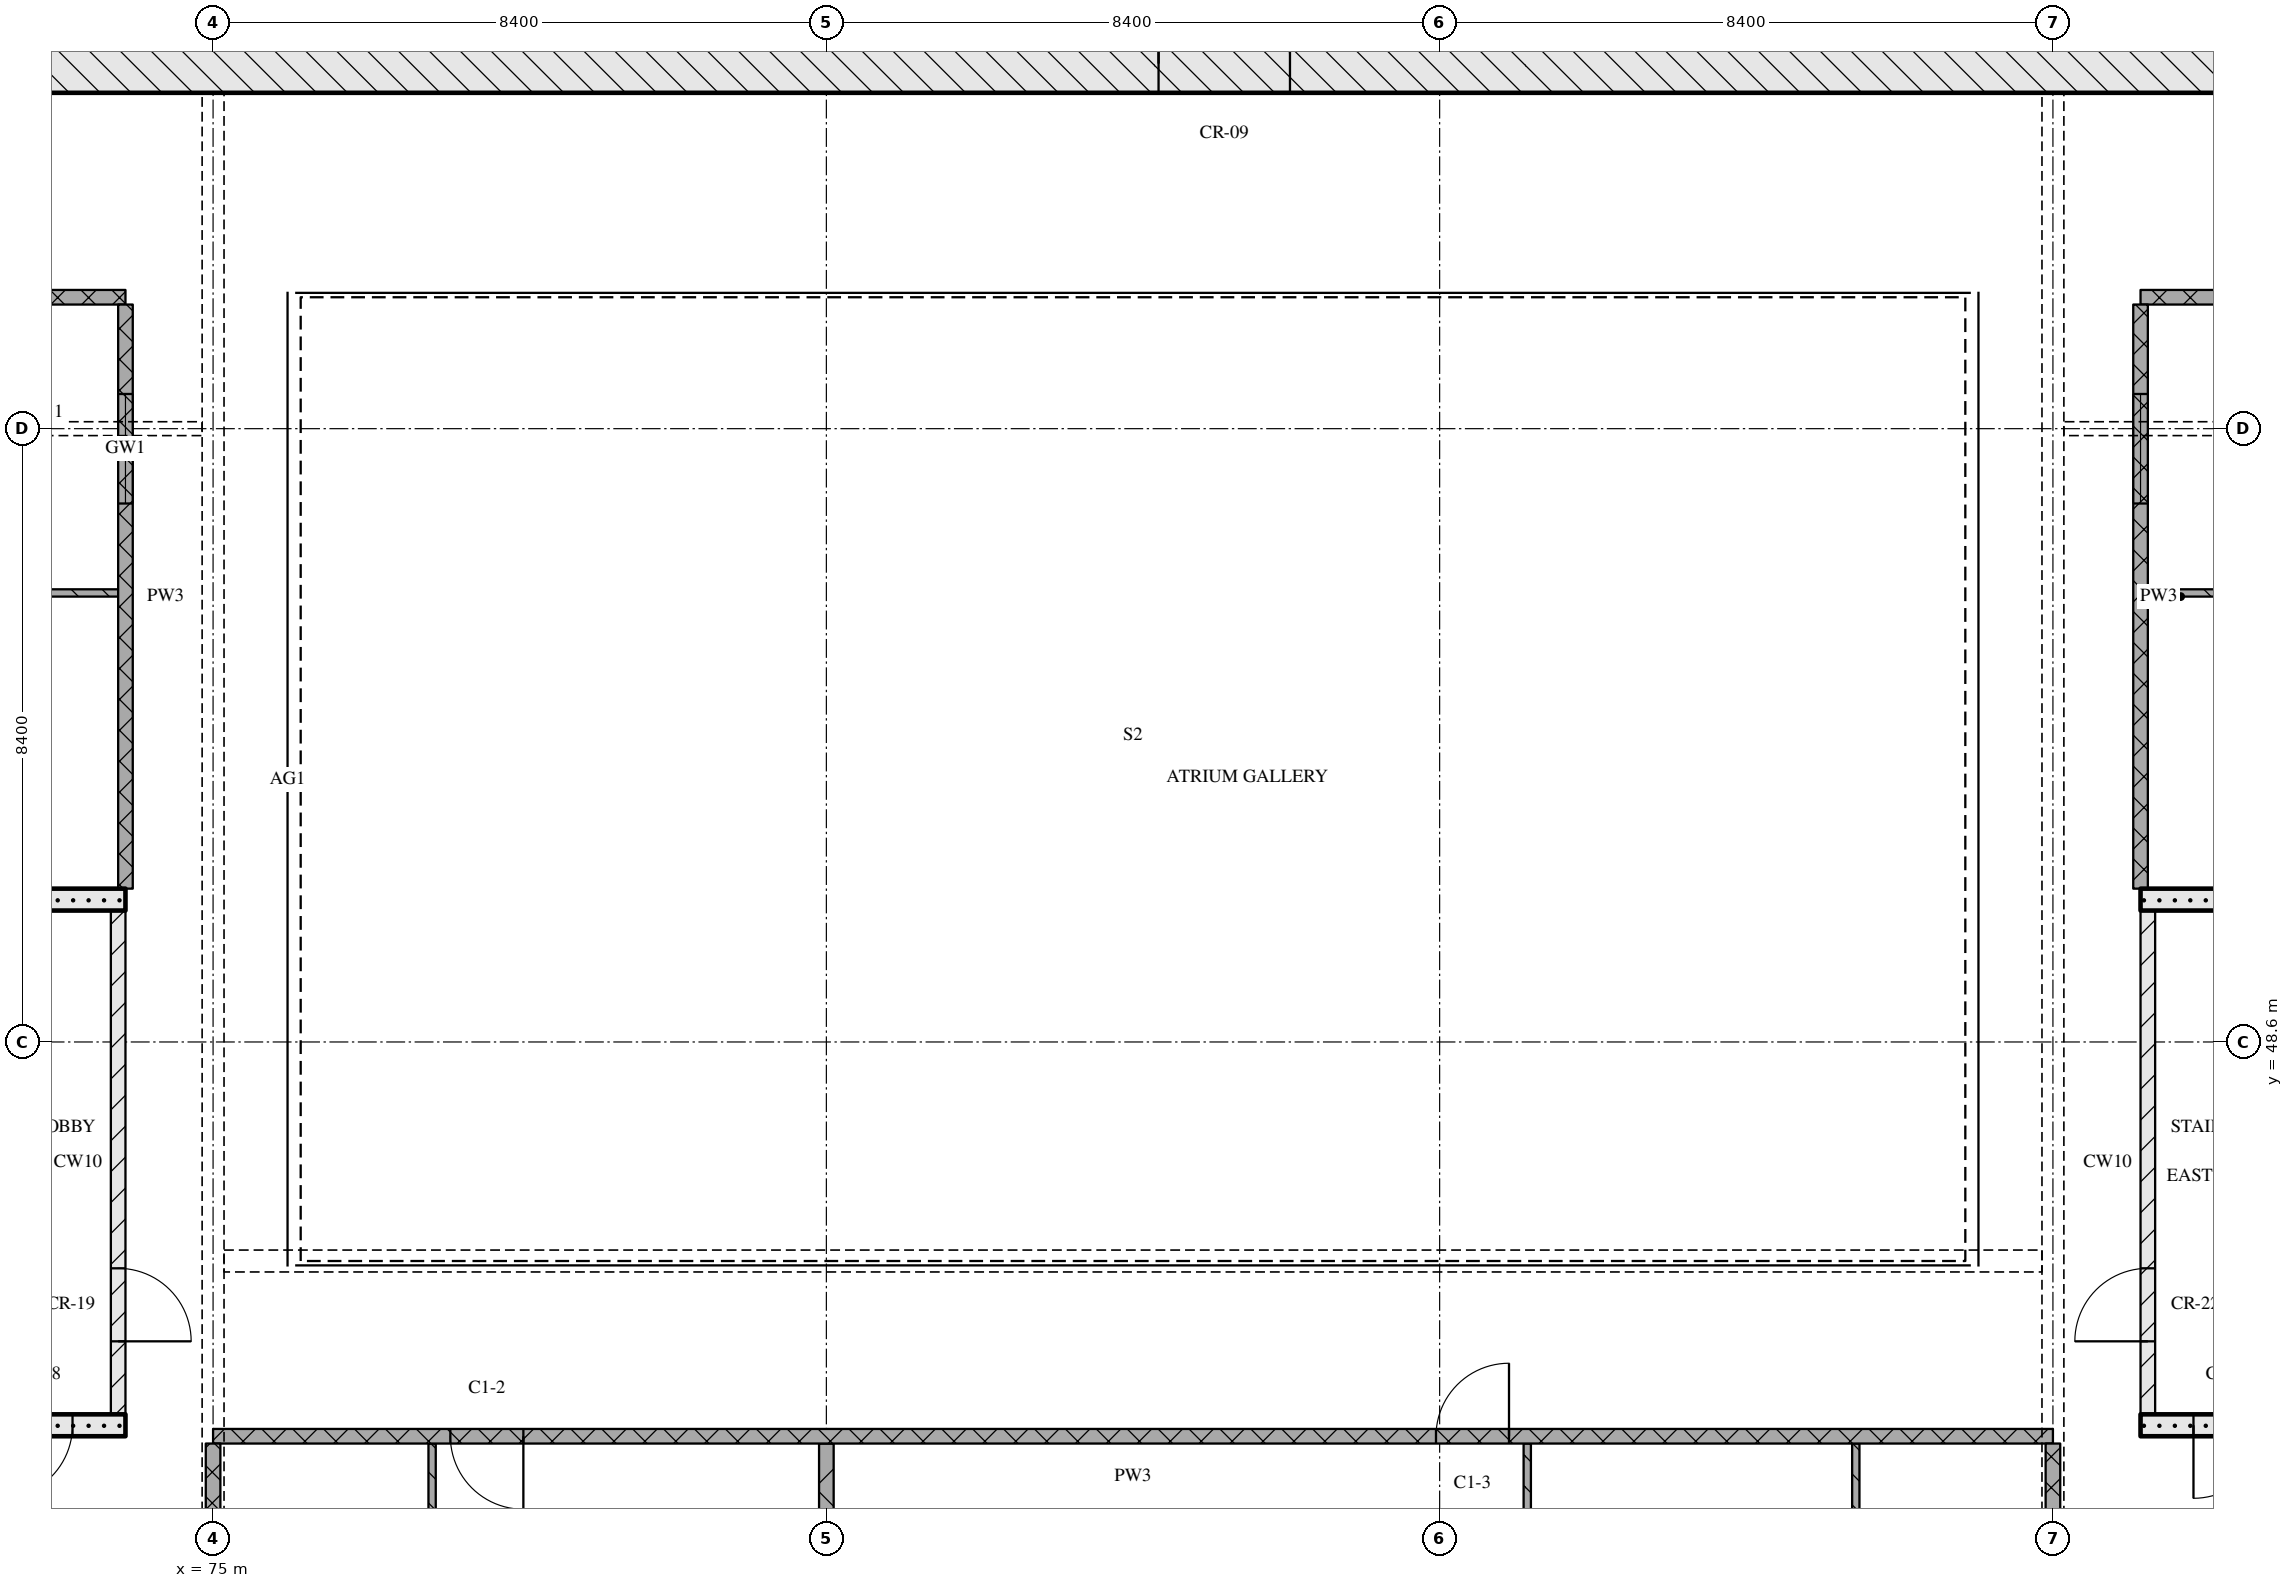
"""IFC4 building model, lengths in metres.
Left out: names, types, materials, properties, quantities, classifications, styles, units other than length and angle.
Written with IfcOpenShell. Run it as: python <this file> out.ifc"""

import sys

from ifc_helpers import new_model, si_unit, direction, frame, frame_2d, origin, place, context, subcontext, project, spatial, rectangle, extrude, element, fill, save


model = new_model("IFC4")
c1 = context("Model", 3, precision=1e-05, world=origin(), true_north=direction((0.0, 1.0)))
c2 = subcontext(c1, "Body", "Model", "MODEL_VIEW")
j1 = project(units=[si_unit("LENGTHUNIT", "METRE"), si_unit("PLANEANGLEUNIT", "RADIAN")], contexts=[c1])
p1 = place(None, origin())
s1 = spatial("IfcSite", under=j1, at=p1, CompositionType="ELEMENT")
p2 = place(p1, origin())
s2 = spatial("IfcBuilding", under=s1, at=p2, CompositionType="ELEMENT")
p3 = place(p2, frame((0.0, 0.0, 154.65)))
s3 = spatial("IfcBuildingStorey", under=s2, at=p3, CompositionType="ELEMENT", Elevation=154.65)
p4 = place(p3, frame((67.0, 62.0, 0.0), z_axis=(0.0, 0.0, 1.0), x_axis=(1.0, 0.0, 0.0)))
e1 = element("IfcWall", 1, at=p4, inside=s3, PredefinedType="SOLIDWALL", context=c2, shape_type="SweptSolid", body=[
    extrude(rectangle(XDim=41.2, YDim=0.8, at=frame_2d((20.6, 0.0))), origin(), (0.0, 0.0, 1.0), 3.32),
])
p5 = place(p4, frame((20.95, 0.0, 0.0)))
e2 = element("IfcOpeningElement", 2, at=p5, cuts=e1, PredefinedType="OPENING", context=c2, shape_type="SweptSolid", body=[
    extrude(rectangle(XDim=1.8, YDim=2.1, at=frame_2d((0.9, 1.05))), frame((0.0, 0.41, 0.0), z_axis=(0.0, -1.0, 0.0), x_axis=(1.0, 0.0, 0.0)), (0.0, 0.0, 1.0), 0.82),
])
p6 = place(p3, frame((68.2, 43.35, 0.0), z_axis=(0.0, 0.0, 1.0), x_axis=(1.0, 0.0, 0.0)))
e3 = element("IfcWall", 3, at=p6, inside=s3, PredefinedType="SOLIDWALL", context=c2, shape_type="SweptSolid", body=[
    extrude(rectangle(XDim=5.6, YDim=0.3, at=frame_2d((2.8, 0.0))), origin(), (0.0, 0.0, 1.0), 3.32),
])
p7 = place(p6, frame((3.875, 0.0, 0.0)))
e4 = element("IfcOpeningElement", 4, at=p7, cuts=e3, PredefinedType="OPENING", context=c2, shape_type="SweptSolid", body=[
    extrude(rectangle(XDim=1.0, YDim=2.1, at=frame_2d((0.5, 1.05))), frame((0.0, 0.16, 0.0), z_axis=(0.0, -1.0, 0.0), x_axis=(1.0, 0.0, 0.0)), (0.0, 0.0, 1.0), 0.32),
])
p8 = place(p3, frame((73.7, 43.5, 0.0), z_axis=(0.0, 0.0, 1.0), x_axis=(0.0, 1.0, 0.0)))
e5 = element("IfcWall", 5, at=p8, inside=s3, PredefinedType="PARTITIONING", context=c2, shape_type="SweptSolid", body=[
    extrude(rectangle(XDim=6.9, YDim=0.2, at=frame_2d((3.45, 0.0))), origin(), (0.0, 0.0, 1.0), 3.32),
])
p9 = place(p8, frame((1.0, 0.0, 0.0)))
e6 = element("IfcOpeningElement", 6, at=p9, cuts=e5, PredefinedType="OPENING", context=c2, shape_type="SweptSolid", body=[
    extrude(rectangle(XDim=1.0, YDim=2.1, at=frame_2d((0.5, 1.05))), frame((0.0, 0.11, 0.0), z_axis=(0.0, -1.0, 0.0), x_axis=(1.0, 0.0, 0.0)), (0.0, 0.0, 1.0), 0.22),
])
p10 = place(p3, frame((68.2, 50.55, 0.0), z_axis=(0.0, 0.0, 1.0), x_axis=(1.0, 0.0, 0.0)))
e7 = element("IfcWall", 7, at=p10, inside=s3, PredefinedType="SOLIDWALL", context=c2, shape_type="SweptSolid", body=[
    extrude(rectangle(XDim=5.6, YDim=0.3, at=frame_2d((2.8, 0.0))), origin(), (0.0, 0.0, 1.0), 3.32),
])
p11 = place(p3, frame((101.4, 43.35, 0.0), z_axis=(0.0, 0.0, 1.0), x_axis=(1.0, 0.0, 0.0)))
e8 = element("IfcWall", 8, at=p11, inside=s3, PredefinedType="SOLIDWALL", context=c2, shape_type="SweptSolid", body=[
    extrude(rectangle(XDim=5.6, YDim=0.3, at=frame_2d((2.8, 0.0))), origin(), (0.0, 0.0, 1.0), 3.32),
])
p12 = place(p11, frame((0.725, 0.0, 0.0)))
e9 = element("IfcOpeningElement", 9, at=p12, cuts=e8, PredefinedType="OPENING", context=c2, shape_type="SweptSolid", body=[
    extrude(rectangle(XDim=1.0, YDim=2.1, at=frame_2d((0.5, 1.05))), frame((0.0, 0.16, 0.0), z_axis=(0.0, -1.0, 0.0), x_axis=(1.0, 0.0, 0.0)), (0.0, 0.0, 1.0), 0.32),
])
p13 = place(p3, frame((101.5, 43.5, 0.0), z_axis=(0.0, 0.0, 1.0), x_axis=(0.0, 1.0, 0.0)))
e10 = element("IfcWall", 10, at=p13, inside=s3, PredefinedType="PARTITIONING", context=c2, shape_type="SweptSolid", body=[
    extrude(rectangle(XDim=6.9, YDim=0.2, at=frame_2d((3.45, 0.0))), origin(), (0.0, 0.0, 1.0), 3.32),
])
p14 = place(p13, frame((1.0, 0.0, 0.0)))
e11 = element("IfcOpeningElement", 11, at=p14, cuts=e10, PredefinedType="OPENING", context=c2, shape_type="SweptSolid", body=[
    extrude(rectangle(XDim=1.0, YDim=2.1, at=frame_2d((0.5, 1.05))), frame((0.0, 0.11, 0.0), z_axis=(0.0, -1.0, 0.0), x_axis=(1.0, 0.0, 0.0)), (0.0, 0.0, 1.0), 0.22),
])
p15 = place(p3, frame((101.4, 50.55, 0.0), z_axis=(0.0, 0.0, 1.0), x_axis=(1.0, 0.0, 0.0)))
e12 = element("IfcWall", 12, at=p15, inside=s3, PredefinedType="SOLIDWALL", context=c2, shape_type="SweptSolid", body=[
    extrude(rectangle(XDim=5.6, YDim=0.3, at=frame_2d((2.8, 0.0))), origin(), (0.0, 0.0, 1.0), 3.32),
])
p16 = place(p3, frame((100.2, 43.2, 0.0), z_axis=(0.0, 0.0, 1.0), x_axis=(-1.0, 0.0, 0.0)))
e13 = element("IfcWall", 13, at=p16, inside=s3, PredefinedType="PARTITIONING", context=c2, shape_type="SweptSolid", body=[
    extrude(rectangle(XDim=25.2, YDim=0.2, at=frame_2d((12.6, 0.0))), origin(), (0.0, 0.0, 1.0), 3.32),
])
p17 = place(p16, frame((7.45, 0.0, 0.0)))
e14 = element("IfcOpeningElement", 14, at=p17, cuts=e13, PredefinedType="OPENING", context=c2, shape_type="SweptSolid", body=[
    extrude(rectangle(XDim=1.0, YDim=2.1, at=frame_2d((0.5, 1.05))), frame((0.0, 0.11, 0.0), z_axis=(0.0, -1.0, 0.0), x_axis=(1.0, 0.0, 0.0)), (0.0, 0.0, 1.0), 0.22),
])
p18 = place(p16, frame((20.95, 0.0, 0.0)))
e15 = element("IfcOpeningElement", 15, at=p18, cuts=e13, PredefinedType="OPENING", context=c2, shape_type="SweptSolid", body=[
    extrude(rectangle(XDim=1.0, YDim=2.1, at=frame_2d((0.5, 1.05))), frame((0.0, 0.11, 0.0), z_axis=(0.0, -1.0, 0.0), x_axis=(1.0, 0.0, 0.0)), (0.0, 0.0, 1.0), 0.22),
])
p19 = place(p3, frame((69.3, 54.75, 0.0), z_axis=(0.0, 0.0, 1.0), x_axis=(1.0, 0.0, 0.0)))
e16 = element("IfcWall", 16, at=p19, inside=s3, PredefinedType="PARTITIONING", context=c2, shape_type="SweptSolid", body=[
    extrude(rectangle(XDim=4.4, YDim=0.1, at=frame_2d((2.2, 0.0))), origin(), (0.0, 0.0, 1.0), 3.32),
])
p20 = place(p3, frame((101.5, 54.75, 0.0), z_axis=(0.0, 0.0, 1.0), x_axis=(1.0, 0.0, 0.0)))
e17 = element("IfcWall", 17, at=p20, inside=s3, PredefinedType="PARTITIONING", context=c2, shape_type="SweptSolid", body=[
    extrude(rectangle(XDim=4.4, YDim=0.1, at=frame_2d((2.2, 0.0))), origin(), (0.0, 0.0, 1.0), 3.32),
])
p21 = place(p20, frame((1.7, 0.0, 0.0)))
e18 = element("IfcOpeningElement", 18, at=p21, cuts=e17, PredefinedType="OPENING", context=c2, shape_type="SweptSolid", body=[
    extrude(rectangle(XDim=0.9, YDim=2.1, at=frame_2d((0.45, 1.05))), frame((0.0, 0.06, 0.0), z_axis=(0.0, -1.0, 0.0), x_axis=(1.0, 0.0, 0.0)), (0.0, 0.0, 1.0), 0.12),
])
for number, where, z_axis, x_axis in (
    (19, (63.0, 58.8, 0.0), (0.0, 0.0, 1.0), (1.0, 0.0, 0.0)),
    (20, (101.4, 58.8, 0.0), (0.0, 0.0, 1.0), (1.0, 0.0, 0.0)),
):
    element("IfcWall", number, at=place(p3, frame(where, z_axis=z_axis, x_axis=x_axis)), inside=s3, PredefinedType="PARTITIONING", context=c2, shape_type="SweptSolid", body=[
        extrude(rectangle(XDim=10.8, YDim=0.2, at=frame_2d((5.4, 0.0))), origin(), (0.0, 0.0, 1.0), 3.32),
    ])
p22 = place(p3, frame((73.8, 58.7, 0.0), z_axis=(0.0, 0.0, 1.0), x_axis=(0.0, -1.0, 0.0)))
e21 = element("IfcWall", 21, at=p22, inside=s3, PredefinedType="PARTITIONING", context=c2, shape_type="SweptSolid", body=[
    extrude(rectangle(XDim=8.0, YDim=0.2, at=frame_2d((4.0, 0.0))), origin(), (0.0, 0.0, 1.0), 3.32),
])
p23 = place(p22, frame((1.225, 0.0, 0.9)))
e22 = element("IfcOpeningElement", 22, at=p23, cuts=e21, PredefinedType="OPENING", context=c2, shape_type="SweptSolid", body=[
    extrude(rectangle(XDim=1.5, YDim=1.5, at=frame_2d((0.75, 0.75))), frame((0.0, 0.11, 0.0), z_axis=(0.0, -1.0, 0.0), x_axis=(1.0, 0.0, 0.0)), (0.0, 0.0, 1.0), 0.22),
])
p24 = place(p3, frame((75.0, 43.1, 0.0), z_axis=(0.0, 0.0, 1.0), x_axis=(0.0, -1.0, 0.0)))
e23 = element("IfcWall", 23, at=p24, inside=s3, PredefinedType="PARTITIONING", context=c2, shape_type="SweptSolid", body=[
    extrude(rectangle(XDim=2.2, YDim=0.2, at=frame_2d((1.1, 0.0))), origin(), (0.0, 0.0, 1.0), 2.43),
])
p25 = place(p3, frame((78.0, 43.1, 0.0), z_axis=(0.0, 0.0, 1.0), x_axis=(0.0, -1.0, 0.0)))
e24 = element("IfcWall", 24, at=p25, inside=s3, PredefinedType="PARTITIONING", context=c2, shape_type="SweptSolid", body=[
    extrude(rectangle(XDim=4.65, YDim=0.1, at=frame_2d((2.325, 0.0))), origin(), (0.0, 0.0, 1.0), 3.32),
])
p26 = place(p3, frame((83.4, 43.1, 0.0), z_axis=(0.0, 0.0, 1.0), x_axis=(0.0, -1.0, 0.0)))
e25 = element("IfcWall", 25, at=p26, inside=s3, PredefinedType="PARTITIONING", context=c2, shape_type="SweptSolid", body=[
    extrude(rectangle(XDim=2.53, YDim=0.2, at=frame_2d((1.265, 0.0))), origin(), (0.0, 0.0, 1.0), 3.32),
])
p27 = place(p3, frame((93.0, 43.1, 0.0), z_axis=(0.0, 0.0, 1.0), x_axis=(0.0, -1.0, 0.0)))
e26 = element("IfcWall", 26, at=p27, inside=s3, PredefinedType="PARTITIONING", context=c2, shape_type="SweptSolid", body=[
    extrude(rectangle(XDim=4.35, YDim=0.1, at=frame_2d((2.175, 0.0))), origin(), (0.0, 0.0, 1.0), 3.32),
])
p28 = place(p27, frame((1.6, 0.0, 0.0)))
e27 = element("IfcOpeningElement", 27, at=p28, cuts=e26, PredefinedType="OPENING", context=c2, shape_type="SweptSolid", body=[
    extrude(rectangle(XDim=0.8, YDim=2.1, at=frame_2d((0.4, 1.05))), frame((0.0, 0.06, 0.0), z_axis=(0.0, -1.0, 0.0), x_axis=(1.0, 0.0, 0.0)), (0.0, 0.0, 1.0), 0.12),
])
p29 = place(p3, frame((97.5, 43.1, 0.0), z_axis=(0.0, 0.0, 1.0), x_axis=(0.0, -1.0, 0.0)))
e28 = element("IfcWall", 28, at=p29, inside=s3, PredefinedType="PARTITIONING", context=c2, shape_type="SweptSolid", body=[
    extrude(rectangle(XDim=4.35, YDim=0.1, at=frame_2d((2.175, 0.0))), origin(), (0.0, 0.0, 1.0), 3.32),
])
p30 = place(p3, frame((100.2, 43.1, 0.0), z_axis=(0.0, 0.0, 1.0), x_axis=(0.0, -1.0, 0.0)))
e29 = element("IfcWall", 29, at=p30, inside=s3, PredefinedType="PARTITIONING", context=c2, shape_type="SweptSolid", body=[
    extrude(rectangle(XDim=2.2, YDim=0.2, at=frame_2d((1.1, 0.0))), origin(), (0.0, 0.0, 1.0), 2.43),
])
p31 = place(p3, frame((101.4, 58.7, 0.0), z_axis=(0.0, 0.0, 1.0), x_axis=(0.0, -1.0, 0.0)))
e30 = element("IfcWall", 30, at=p31, inside=s3, PredefinedType="PARTITIONING", context=c2, shape_type="SweptSolid", body=[
    extrude(rectangle(XDim=8.0, YDim=0.2, at=frame_2d((4.0, 0.0))), origin(), (0.0, 0.0, 1.0), 3.32),
])
p32 = place(p31, frame((1.225, 0.0, 0.9)))
e31 = element("IfcOpeningElement", 31, at=p32, cuts=e30, PredefinedType="OPENING", context=c2, shape_type="SweptSolid", body=[
    extrude(rectangle(XDim=1.5, YDim=1.5, at=frame_2d((0.75, 0.75))), frame((0.0, 0.11, 0.0), z_axis=(0.0, -1.0, 0.0), x_axis=(1.0, 0.0, 0.0)), (0.0, 0.0, 1.0), 0.22),
])
p33 = place(p5, origin())
e32 = element("IfcDoor", 32, at=p33, inside=s3, OperationType="DOUBLE_DOOR_SINGLE_SWING", PredefinedType="DOOR", context=c2, shape_type="SweptSolid", body=[
    extrude(rectangle(XDim=1.8, YDim=2.1, at=frame_2d((0.9, 1.05))), frame((0.0, 0.025, 0.0), z_axis=(0.0, -1.0, 0.0), x_axis=(1.0, 0.0, 0.0)), (0.0, 0.0, 1.0), 0.05),
])
fill(e2, e32)
p34 = place(p7, origin())
e33 = element("IfcDoor", 33, at=p34, inside=s3, OperationType="SINGLE_SWING_RIGHT", PredefinedType="DOOR", context=c2, shape_type="SweptSolid", body=[
    extrude(rectangle(XDim=1.0, YDim=2.1, at=frame_2d((0.5, 1.05))), frame((0.0, 0.025, 0.0), z_axis=(0.0, -1.0, 0.0), x_axis=(1.0, 0.0, 0.0)), (0.0, 0.0, 1.0), 0.05),
])
fill(e4, e33)
p35 = place(p9, origin())
e34 = element("IfcDoor", 34, at=p35, inside=s3, OperationType="SINGLE_SWING_RIGHT", PredefinedType="DOOR", context=c2, shape_type="SweptSolid", body=[
    extrude(rectangle(XDim=1.0, YDim=2.1, at=frame_2d((0.5, 1.05))), frame((0.0, 0.025, 0.0), z_axis=(0.0, -1.0, 0.0), x_axis=(1.0, 0.0, 0.0)), (0.0, 0.0, 1.0), 0.05),
])
fill(e6, e34)
p36 = place(p12, origin())
e35 = element("IfcDoor", 35, at=p36, inside=s3, OperationType="SINGLE_SWING_RIGHT", PredefinedType="DOOR", context=c2, shape_type="SweptSolid", body=[
    extrude(rectangle(XDim=1.0, YDim=2.1, at=frame_2d((0.5, 1.05))), frame((0.0, 0.025, 0.0), z_axis=(0.0, -1.0, 0.0), x_axis=(1.0, 0.0, 0.0)), (0.0, 0.0, 1.0), 0.05),
])
fill(e9, e35)
p37 = place(p14, origin())
e36 = element("IfcDoor", 36, at=p37, inside=s3, OperationType="SINGLE_SWING_LEFT", PredefinedType="DOOR", context=c2, shape_type="SweptSolid", body=[
    extrude(rectangle(XDim=1.0, YDim=2.1, at=frame_2d((0.5, 1.05))), frame((0.0, 0.025, 0.0), z_axis=(0.0, -1.0, 0.0), x_axis=(1.0, 0.0, 0.0)), (0.0, 0.0, 1.0), 0.05),
])
fill(e11, e36)
p38 = place(p17, origin())
e37 = element("IfcDoor", 37, at=p38, inside=s3, OperationType="SINGLE_SWING_RIGHT", PredefinedType="DOOR", context=c2, shape_type="SweptSolid", body=[
    extrude(rectangle(XDim=1.0, YDim=2.1, at=frame_2d((0.5, 1.05))), frame((0.0, 0.025, 0.0), z_axis=(0.0, -1.0, 0.0), x_axis=(1.0, 0.0, 0.0)), (0.0, 0.0, 1.0), 0.05),
])
fill(e14, e37)
p39 = place(p18, origin())
e38 = element("IfcDoor", 38, at=p39, inside=s3, OperationType="SINGLE_SWING_LEFT", PredefinedType="DOOR", context=c2, shape_type="SweptSolid", body=[
    extrude(rectangle(XDim=1.0, YDim=2.1, at=frame_2d((0.5, 1.05))), frame((0.0, 0.025, 0.0), z_axis=(0.0, -1.0, 0.0), x_axis=(1.0, 0.0, 0.0)), (0.0, 0.0, 1.0), 0.05),
])
fill(e15, e38)
p40 = place(p23, origin())
e39 = element("IfcWindow", 39, at=p40, inside=s3, PartitioningType="SINGLE_PANEL", PredefinedType="WINDOW", context=c2, shape_type="SweptSolid", body=[
    extrude(rectangle(XDim=1.5, YDim=1.5, at=frame_2d((0.75, 0.75))), frame((0.0, 0.03, 0.0), z_axis=(0.0, -1.0, 0.0), x_axis=(1.0, 0.0, 0.0)), (0.0, 0.0, 1.0), 0.06),
])
fill(e22, e39)
p41 = place(p32, origin())
e40 = element("IfcWindow", 40, at=p41, inside=s3, PartitioningType="SINGLE_PANEL", PredefinedType="WINDOW", context=c2, shape_type="SweptSolid", body=[
    extrude(rectangle(XDim=1.5, YDim=1.5, at=frame_2d((0.75, 0.75))), frame((0.0, 0.03, 0.0), z_axis=(0.0, -1.0, 0.0), x_axis=(1.0, 0.0, 0.0)), (0.0, 0.0, 1.0), 0.06),
])
fill(e31, e40)
save(model, sys.argv[1])
